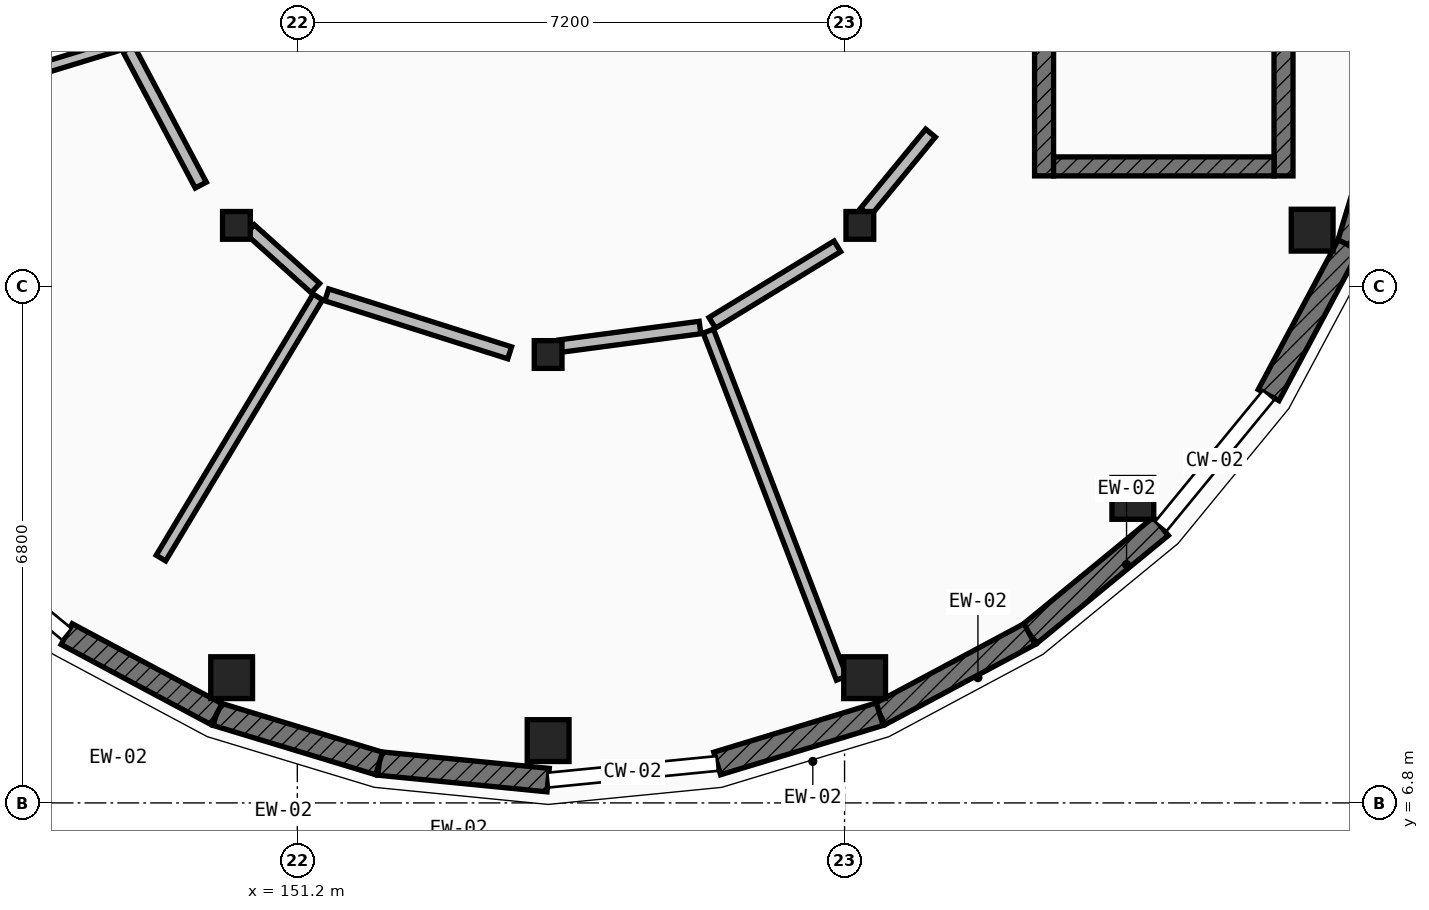
"""IFC4 building model, lengths in metres.
Left out: names, types, materials, properties, quantities, classifications, styles, units other than length and angle.
Written with IfcOpenShell. Run it as: python <this file> out.ifc"""

import sys

from ifc_helpers import new_model, si_unit, direction, frame, frame_2d, origin, origin_2d, place, context, subcontext, project, spatial, rectangle, circle, extrude, element, fill, save


model = new_model("IFC4")
c1 = context("Model", 3, precision=1e-05, world=origin(), true_north=direction((0.0, 1.0)))
c2 = subcontext(c1, "Body", "Model", "MODEL_VIEW")
j1 = project(units=[si_unit("LENGTHUNIT", "METRE"), si_unit("PLANEANGLEUNIT", "RADIAN")], contexts=[c1])
p1 = place(None, origin())
s1 = spatial("IfcSite", under=j1, at=p1, CompositionType="ELEMENT")
p2 = place(p1, origin())
s2 = spatial("IfcBuilding", under=s1, at=p2, CompositionType="ELEMENT")
p3 = place(p2, origin())
s3 = spatial("IfcBuildingStorey", under=s2, at=p3, CompositionType="ELEMENT", Elevation=0.0)
for number, where, z_axis, x_axis in (
    (1, (150.336, 8.448, 0.0), (0.0, 0.0, 1.0), (1.0, 0.0, 0.0)),
    (2, (154.5, 7.62, 0.0), (0.0, 0.0, 1.0), (1.0, 0.0, 0.0)),
    (3, (158.664, 8.448, 0.0), (0.0, 0.0, 1.0), (1.0, 0.0, 0.0)),
    (4, (162.193, 10.807, 0.0), (0.0, 0.0, 1.0), (1.0, 0.0, 0.0)),
    (5, (164.552, 14.336, 0.0), (0.0, 0.0, 1.0), (1.0, 0.0, 0.0)),
):
    element("IfcColumn", number, at=place(p3, frame(where, z_axis=z_axis, x_axis=x_axis)), inside=s3, PredefinedType="PILASTER", context=c2, shape_type="SweptSolid", body=[
        extrude(circle(Radius=0.275, at=origin_2d()), origin(), (0.0, 0.0, 1.0), 4.55),
    ])
for number, where, z_axis, x_axis in (
    (6, (150.399, 14.399, 0.0), (0.0, 0.0, 1.0), (1.0, 0.0, 0.0)),
    (7, (154.5, 12.7, 0.0), (0.0, 0.0, 1.0), (1.0, 0.0, 0.0)),
    (8, (158.601, 14.399, 0.0), (0.0, 0.0, 1.0), (1.0, 0.0, 0.0)),
):
    element("IfcColumn", number, at=place(p3, frame(where, z_axis=z_axis, x_axis=x_axis)), inside=s3, PredefinedType="COLUMN", context=c2, shape_type="SweptSolid", body=[
        extrude(rectangle(XDim=0.365, YDim=0.365, at=origin_2d()), origin(), (0.0, 0.0, 1.0), 4.55),
    ])
p4 = place(p3, frame((165.681, 16.276, 0.0), z_axis=(0.0, 0.0, 1.0), x_axis=(-0.290322655883, -0.956928814218, 0.0)))
e9 = element("IfcWall", 9, at=p4, inside=s3, PredefinedType="SOLIDWALL", context=c2, shape_type="SweptSolid", body=[
    extrude(rectangle(XDim=2.235, YDim=0.31, at=frame_2d((1.118, 0.0))), origin(), (0.0, 0.0, 1.0), 3.659),
])
p5 = place(p3, frame((165.032, 14.137, 0.0), z_axis=(0.0, 0.0, 1.0), x_axis=(-0.471217561446, -0.882017012185, 0.0)))
e10 = element("IfcWall", 10, at=p5, inside=s3, PredefinedType="SOLIDWALL", context=c2, shape_type="SweptSolid", body=[
    extrude(rectangle(XDim=2.235, YDim=0.31, at=frame_2d((1.117, 0.0))), origin(), (0.0, 0.0, 1.0), 3.659),
])
p6 = place(p5, frame((0.417, 0.0, 0.0)))
e11 = element("IfcOpeningElement", 11, at=p6, cuts=e10, PredefinedType="OPENING", context=c2, shape_type="SweptSolid", body=[
    extrude(rectangle(XDim=1.4, YDim=2.3, at=frame_2d((0.7, 1.15))), frame((0.0, 0.165, 0.0), z_axis=(0.0, -1.0, 0.0), x_axis=(1.0, 0.0, 0.0)), (0.0, 0.0, 1.0), 0.33),
])
for number, where, z_axis, x_axis in (
    (12, (162.561, 10.439, 0.0), (0.0, 0.0, 1.0), (-0.773, -0.635, 0.0)),
    (13, (160.834, 9.021, 0.0), (0.0, 0.0, 1.0), (-0.882, -0.471, 0.0)),
):
    element("IfcWall", number, at=place(p3, frame(where, z_axis=z_axis, x_axis=x_axis)), inside=s3, PredefinedType="SOLIDWALL", context=c2, shape_type="SweptSolid", body=[
        extrude(rectangle(XDim=2.235, YDim=0.31, at=frame_2d((1.117, 0.0))), origin(), (0.0, 0.0, 1.0), 3.659),
    ])
p7 = place(p3, frame((158.863, 7.968, 0.0), z_axis=(0.0, 0.0, 1.0), x_axis=(-0.956928814218, -0.290322655883, 0.0)))
e14 = element("IfcWall", 14, at=p7, inside=s3, PredefinedType="SOLIDWALL", context=c2, shape_type="SweptSolid", body=[
    extrude(rectangle(XDim=2.235, YDim=0.31, at=frame_2d((1.118, 0.0))), origin(), (0.0, 0.0, 1.0), 3.659),
])
p8 = place(p3, frame((154.5, 7.1, 0.0), z_axis=(0.0, 0.0, 1.0), x_axis=(-0.995187461503, 0.097989369151, 0.0)))
e15 = element("IfcWall", 15, at=p8, inside=s3, PredefinedType="SOLIDWALL", context=c2, shape_type="SweptSolid", body=[
    extrude(rectangle(XDim=2.235, YDim=0.31, at=frame_2d((1.117, 0.0))), origin(), (0.0, 0.0, 1.0), 3.659),
])
p9 = place(p3, frame((152.276, 7.319, 0.0), z_axis=(0.0, 0.0, 1.0), x_axis=(-0.956928814218, 0.290322655883, 0.0)))
e16 = element("IfcWall", 16, at=p9, inside=s3, PredefinedType="SOLIDWALL", context=c2, shape_type="SweptSolid", body=[
    extrude(rectangle(XDim=2.235, YDim=0.31, at=frame_2d((1.118, 0.0))), origin(), (0.0, 0.0, 1.0), 3.659),
])
p10 = place(p3, frame((150.137, 7.968, 0.0), z_axis=(0.0, 0.0, 1.0), x_axis=(-0.882017012185, 0.471217561446, 0.0)))
e17 = element("IfcWall", 17, at=p10, inside=s3, PredefinedType="SOLIDWALL", context=c2, shape_type="SweptSolid", body=[
    extrude(rectangle(XDim=2.235, YDim=0.31, at=frame_2d((1.117, 0.0))), origin(), (0.0, 0.0, 1.0), 3.659),
])
p11 = place(p10, frame((0.467, 0.0, 0.0)))
e18 = element("IfcOpeningElement", 18, at=p11, cuts=e17, PredefinedType="OPENING", context=c2, shape_type="SweptSolid", body=[
    extrude(rectangle(XDim=1.3, YDim=2.25, at=frame_2d((0.65, 1.125))), frame((0.0, 0.165, 0.0), z_axis=(0.0, -1.0, 0.0), x_axis=(1.0, 0.0, 0.0)), (0.0, 0.0, 1.0), 0.33),
])
p12 = place(p3, frame((161.025, 21.95, 0.0), z_axis=(0.0, 0.0, 1.0), x_axis=(0.0, -1.0, 0.0)))
e19 = element("IfcWall", 19, at=p12, inside=s3, PredefinedType="SHEAR", context=c2, shape_type="SweptSolid", body=[
    extrude(rectangle(XDim=6.9, YDim=0.25, at=frame_2d((3.45, 0.0))), origin(), (0.0, 0.0, 1.0), 4.305),
])
p13 = place(p12, frame((0.43, 0.0, 0.0)))
e20 = element("IfcOpeningElement", 20, at=p13, cuts=e19, PredefinedType="OPENING", context=c2, shape_type="SweptSolid", body=[
    extrude(rectangle(XDim=1.1, YDim=2.15, at=frame_2d((0.55, 1.075))), frame((0.0, 0.135, 0.0), z_axis=(0.0, -1.0, 0.0), x_axis=(1.0, 0.0, 0.0)), (0.0, 0.0, 1.0), 0.27),
])
p14 = place(p3, frame((164.175, 21.95, 0.0), z_axis=(0.0, 0.0, 1.0), x_axis=(0.0, -1.0, 0.0)))
e21 = element("IfcWall", 21, at=p14, inside=s3, PredefinedType="SHEAR", context=c2, shape_type="SweptSolid", body=[
    extrude(rectangle(XDim=6.9, YDim=0.25, at=frame_2d((3.45, 0.0))), origin(), (0.0, 0.0, 1.0), 4.305),
])
p15 = place(p3, frame((161.15, 15.175, 0.0), z_axis=(0.0, 0.0, 1.0), x_axis=(1.0, 0.0, 0.0)))
e22 = element("IfcWall", 22, at=p15, inside=s3, PredefinedType="SHEAR", context=c2, shape_type="SweptSolid", body=[
    extrude(rectangle(XDim=2.9, YDim=0.25, at=frame_2d((1.45, 0.0))), origin(), (0.0, 0.0, 1.0), 4.305),
])
p16 = place(p3, frame((148.874, 16.78, 0.0), z_axis=(0.0, 0.0, 1.0), x_axis=(-0.956297390361, -0.292395795436, 0.0)))
e23 = element("IfcWall", 23, at=p16, inside=s3, PredefinedType="PARTITIONING", context=c2, shape_type="SweptSolid", body=[
    extrude(rectangle(XDim=4.864, YDim=0.145, at=frame_2d((2.432, 0.0))), origin(), (0.0, 0.0, 1.0), 3.634),
])
p17 = place(p3, frame((151.47, 13.457, 0.0), z_axis=(0.0, 0.0, 1.0), x_axis=(-0.515033199945, -0.857170229858, 0.0)))
e24 = element("IfcWall", 24, at=p17, inside=s3, PredefinedType="PARTITIONING", context=c2, shape_type="SweptSolid", body=[
    extrude(rectangle(XDim=4.007, YDim=0.145, at=frame_2d((2.004, 0.0))), origin(), (0.0, 0.0, 1.0), 3.634),
])
p18 = place(p3, frame((156.608, 13.008, 0.0), z_axis=(0.0, 0.0, 1.0), x_axis=(0.358370363431, -0.93357949989, 0.0)))
e25 = element("IfcWall", 25, at=p18, inside=s3, PredefinedType="PARTITIONING", context=c2, shape_type="SweptSolid", body=[
    extrude(rectangle(XDim=4.892, YDim=0.145, at=frame_2d((2.446, 0.0))), origin(), (0.0, 0.0, 1.0), 3.634),
])
p19 = place(p3, frame((148.979, 16.722, 0.0), z_axis=(0.0, 0.0, 1.0), x_axis=(0.468545306674, -0.883439469117, 0.0)))
e26 = element("IfcWall", 26, at=p19, inside=s3, PredefinedType="PARTITIONING", context=c2, shape_type="SweptSolid", body=[
    extrude(rectangle(XDim=2.03, YDim=0.165, at=frame_2d((1.015, 0.0))), origin(), (0.0, 0.0, 1.0), 3.634),
])
p20 = place(p19, frame((0.505, 0.0, 0.0)))
e27 = element("IfcOpeningElement", 27, at=p20, cuts=e26, PredefinedType="OPENING", context=c2, shape_type="SweptSolid", body=[
    extrude(rectangle(XDim=1.02, YDim=2.2, at=frame_2d((0.51, 1.1))), frame((0.0, 0.093, 0.0), z_axis=(0.0, -1.0, 0.0), x_axis=(1.0, 0.0, 0.0)), (0.0, 0.0, 1.0), 0.185),
])
p21 = place(p3, frame((150.579, 14.346, 0.0), z_axis=(0.0, 0.0, 1.0), x_axis=(0.743692994732, -0.668521300773, 0.0)))
e28 = element("IfcWall", 28, at=p21, inside=s3, PredefinedType="PARTITIONING", context=c2, shape_type="SweptSolid", body=[
    extrude(rectangle(XDim=1.156, YDim=0.165, at=frame_2d((0.578, 0.0))), origin(), (0.0, 0.0, 1.0), 3.634),
])
p22 = place(p3, frame((151.587, 13.485, 0.0), z_axis=(0.0, 0.0, 1.0), x_axis=(0.953231317115, -0.302241717953, 0.0)))
e29 = element("IfcWall", 29, at=p22, inside=s3, PredefinedType="PARTITIONING", context=c2, shape_type="SweptSolid", body=[
    extrude(rectangle(XDim=2.525, YDim=0.165, at=frame_2d((1.263, 0.0))), origin(), (0.0, 0.0, 1.0), 3.634),
])
p23 = place(p22, frame((0.708, 0.0, 0.0)))
e30 = element("IfcOpeningElement", 30, at=p23, cuts=e29, PredefinedType="OPENING", context=c2, shape_type="SweptSolid", body=[
    extrude(rectangle(XDim=1.11, YDim=2.25, at=frame_2d((0.555, 1.125))), frame((0.0, 0.093, 0.0), z_axis=(0.0, -1.0, 0.0), x_axis=(1.0, 0.0, 0.0)), (0.0, 0.0, 1.0), 0.185),
])
p24 = place(p3, frame((154.652, 12.81, 0.0), z_axis=(0.0, 0.0, 1.0), x_axis=(0.991315849542, 0.13150241993, 0.0)))
e31 = element("IfcWall", 31, at=p24, inside=s3, PredefinedType="PARTITIONING", context=c2, shape_type="SweptSolid", body=[
    extrude(rectangle(XDim=1.862, YDim=0.165, at=frame_2d((0.931, 0.0))), origin(), (0.0, 0.0, 1.0), 3.634),
])
p25 = place(p3, frame((156.659, 13.117, 0.0), z_axis=(0.0, 0.0, 1.0), x_axis=(0.853231776627, 0.521531912115, 0.0)))
e32 = element("IfcWall", 32, at=p25, inside=s3, PredefinedType="PARTITIONING", context=c2, shape_type="SweptSolid", body=[
    extrude(rectangle(XDim=1.929, YDim=0.165, at=frame_2d((0.965, 0.0))), origin(), (0.0, 0.0, 1.0), 3.634),
])
p26 = place(p25, frame((0.455, 0.0, 0.0)))
e33 = element("IfcOpeningElement", 33, at=p26, cuts=e32, PredefinedType="OPENING", context=c2, shape_type="SweptSolid", body=[
    extrude(rectangle(XDim=1.02, YDim=2.2, at=frame_2d((0.51, 1.1))), frame((0.0, 0.093, 0.0), z_axis=(0.0, -1.0, 0.0), x_axis=(1.0, 0.0, 0.0)), (0.0, 0.0, 1.0), 0.185),
])
p27 = place(p3, frame((158.674, 14.572, 0.0), z_axis=(0.0, 0.0, 1.0), x_axis=(0.635542225464, 0.772066110934, 0.0)))
e34 = element("IfcWall", 34, at=p27, inside=s3, PredefinedType="PARTITIONING", context=c2, shape_type="SweptSolid", body=[
    extrude(rectangle(XDim=1.348, YDim=0.165, at=frame_2d((0.674, 0.0))), origin(), (0.0, 0.0, 1.0), 3.634),
])
p28 = place(p6, origin())
e35 = element("IfcDoor", 35, at=p28, inside=s3, OperationType="SINGLE_SWING_LEFT", PredefinedType="DOOR", context=c2, shape_type="SweptSolid", body=[
    extrude(rectangle(XDim=1.4, YDim=2.3, at=frame_2d((0.7, 1.15))), frame((0.0, 0.025, 0.0), z_axis=(0.0, -1.0, 0.0), x_axis=(1.0, 0.0, 0.0)), (0.0, 0.0, 1.0), 0.05),
])
fill(e11, e35)
p29 = place(p11, origin())
e36 = element("IfcDoor", 36, at=p29, inside=s3, OperationType="SINGLE_SWING_RIGHT", PredefinedType="DOOR", context=c2, shape_type="SweptSolid", body=[
    extrude(rectangle(XDim=1.3, YDim=2.25, at=frame_2d((0.65, 1.125))), frame((0.0, 0.025, 0.0), z_axis=(0.0, -1.0, 0.0), x_axis=(1.0, 0.0, 0.0)), (0.0, 0.0, 1.0), 0.05),
])
fill(e18, e36)
p30 = place(p20, origin())
e37 = element("IfcDoor", 37, at=p30, inside=s3, OperationType="SINGLE_SWING_RIGHT", PredefinedType="DOOR", context=c2, shape_type="SweptSolid", body=[
    extrude(rectangle(XDim=1.02, YDim=2.2, at=frame_2d((0.51, 1.1))), frame((0.0, 0.025, 0.0), z_axis=(0.0, -1.0, 0.0), x_axis=(1.0, 0.0, 0.0)), (0.0, 0.0, 1.0), 0.05),
])
fill(e27, e37)
p31 = place(p23, origin())
e38 = element("IfcDoor", 38, at=p31, inside=s3, OperationType="SINGLE_SWING_LEFT", PredefinedType="DOOR", context=c2, shape_type="SweptSolid", body=[
    extrude(rectangle(XDim=1.11, YDim=2.25, at=frame_2d((0.555, 1.125))), frame((0.0, 0.025, 0.0), z_axis=(0.0, -1.0, 0.0), x_axis=(1.0, 0.0, 0.0)), (0.0, 0.0, 1.0), 0.05),
])
fill(e30, e38)
p32 = place(p26, origin())
e39 = element("IfcDoor", 39, at=p32, inside=s3, OperationType="SINGLE_SWING_RIGHT", PredefinedType="DOOR", context=c2, shape_type="SweptSolid", body=[
    extrude(rectangle(XDim=1.02, YDim=2.2, at=frame_2d((0.51, 1.1))), frame((0.0, 0.025, 0.0), z_axis=(0.0, -1.0, 0.0), x_axis=(1.0, 0.0, 0.0)), (0.0, 0.0, 1.0), 0.05),
])
fill(e33, e39)
save(model, sys.argv[1])
